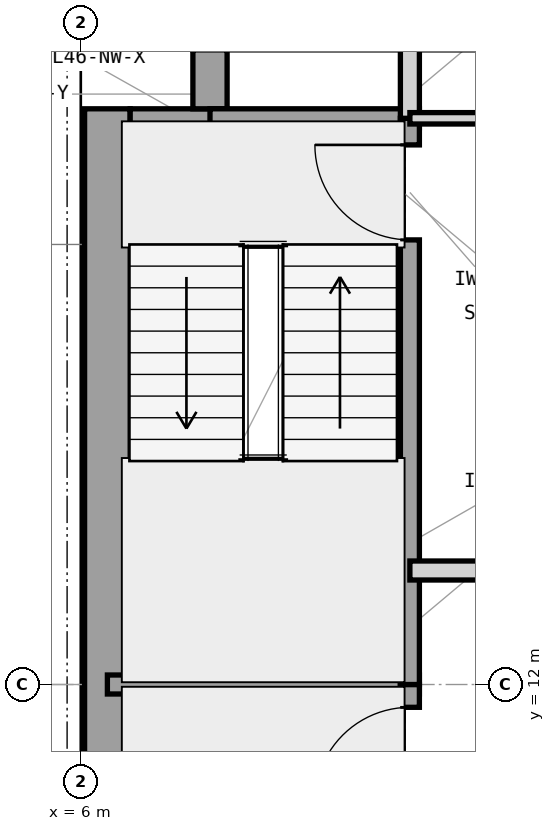
"""IFC4 building model, lengths in metres.
Left out: names, types, materials, properties, quantities, classifications, styles, units other than length and angle.
Written with IfcOpenShell. Run it as: python <this file> out.ifc"""

import sys

from ifc_helpers import new_model, si_unit, direction, frame, frame_2d, origin, place, context, subcontext, project, spatial, rectangle, extrude, element, fill, save


model = new_model("IFC4")
c1 = context("Model", 3, precision=1e-05, world=origin(), true_north=direction((0.0, 1.0)))
c2 = subcontext(c1, "Body", "Model", "MODEL_VIEW")
j1 = project(units=[si_unit("LENGTHUNIT", "METRE"), si_unit("PLANEANGLEUNIT", "RADIAN")], contexts=[c1])
p1 = place(None, origin())
s1 = spatial("IfcSite", under=j1, at=p1, CompositionType="ELEMENT")
p2 = place(p1, origin())
s2 = spatial("IfcBuilding", under=s1, at=p2, CompositionType="ELEMENT")
p3 = place(p2, frame((0.0, 0.0, 191.7)))
s3 = spatial("IfcBuildingStorey", under=s2, at=p3, CompositionType="ELEMENT", Elevation=191.7)
p4 = place(p3, frame((6.35, 4.425, 0.0), z_axis=(0.0, 0.0, 1.0), x_axis=(0.0, 1.0, 0.0)))
e1 = element("IfcWall", 1, at=p4, inside=s3, PredefinedType="SHEAR", context=c2, shape_type="SweptSolid", body=[
    extrude(rectangle(XDim=15.15, YDim=0.6, at=frame_2d((7.575, 0.0))), origin(), (0.0, 0.0, 1.0), 3.9),
])
p5 = place(p3, frame((6.65, 19.35, 0.0), z_axis=(0.0, 0.0, 1.0), x_axis=(1.0, 0.0, 0.0)))
e2 = element("IfcWall", 2, at=p5, inside=s3, PredefinedType="SHEAR", context=c2, shape_type="SweptSolid", body=[
    extrude(rectangle(XDim=1.275, YDim=0.45, at=frame_2d((0.638, 0.0))), origin(), (0.0, 0.0, 1.0), 3.9),
])
p6 = place(p3, frame((7.7, 19.575, 0.0), z_axis=(0.0, 0.0, 1.0), x_axis=(0.0, 1.0, 0.0)))
e3 = element("IfcWall", 3, at=p6, inside=s3, PredefinedType="SHEAR", context=c2, shape_type="SweptSolid", body=[
    extrude(rectangle(XDim=0.775, YDim=0.45, at=frame_2d((0.388, 0.0))), origin(), (0.0, 0.0, 1.0), 3.9),
])
p7 = place(p3, frame((6.35, 12.0, 0.0), z_axis=(0.0, 0.0, 1.0), x_axis=(1.0, 0.0, 0.0)))
e4 = element("IfcWall", 4, at=p7, inside=s3, PredefinedType="SHEAR", context=c2, shape_type="SweptSolid", body=[
    extrude(rectangle(XDim=4.105, YDim=0.25, at=frame_2d((2.052, 0.0))), origin(), (0.0, 0.0, 1.0), 3.9),
])
p8 = place(p3, frame((7.7, 19.45, 0.0), z_axis=(0.0, 0.0, 1.0), x_axis=(1.0, 0.0, 0.0)))
e5 = element("IfcWall", 5, at=p8, inside=s3, PredefinedType="SHEAR", context=c2, shape_type="SweptSolid", body=[
    extrude(rectangle(XDim=2.755, YDim=0.25, at=frame_2d((1.377, 0.0))), origin(), (0.0, 0.0, 1.0), 3.9),
])
p9 = place(p3, frame((10.33, 4.55, 0.0), z_axis=(0.0, 0.0, 1.0), x_axis=(0.0, 1.0, 0.0)))
e6 = element("IfcWall", 6, at=p9, inside=s3, PredefinedType="SHEAR", context=c2, shape_type="SweptSolid", body=[
    extrude(rectangle(XDim=7.45, YDim=0.25, at=frame_2d((3.725, 0.0))), origin(), (0.0, 0.0, 1.0), 3.9),
])
p10 = place(p9, frame((5.9, 0.0, 0.0)))
e7 = element("IfcOpeningElement", 7, at=p10, cuts=e6, PredefinedType="OPENING", context=c2, shape_type="SweptSolid", body=[
    extrude(rectangle(XDim=1.25, YDim=2.2, at=frame_2d((0.625, 1.1))), frame((0.0, 0.135, 0.0), z_axis=(0.0, -1.0, 0.0), x_axis=(1.0, 0.0, 0.0)), (0.0, 0.0, 1.0), 0.27),
])
p11 = place(p3, frame((10.33, 12.0, 0.0), z_axis=(0.0, 0.0, 1.0), x_axis=(0.0, 1.0, 0.0)))
e8 = element("IfcWall", 8, at=p11, inside=s3, PredefinedType="SHEAR", context=c2, shape_type="SweptSolid", body=[
    extrude(rectangle(XDim=7.45, YDim=0.25, at=frame_2d((3.725, 0.0))), origin(), (0.0, 0.0, 1.0), 3.9),
])
p12 = place(p11, frame((5.85, 0.0, 0.0)))
e9 = element("IfcOpeningElement", 9, at=p12, cuts=e8, PredefinedType="OPENING", context=c2, shape_type="SweptSolid", body=[
    extrude(rectangle(XDim=1.25, YDim=2.2, at=frame_2d((0.625, 1.1))), frame((0.0, 0.135, 0.0), z_axis=(0.0, -1.0, 0.0), x_axis=(1.0, 0.0, 0.0)), (0.0, 0.0, 1.0), 0.27),
])
p13 = place(p3, frame((10.33, 19.45, 0.0), z_axis=(0.0, 0.0, 1.0), x_axis=(0.0, 1.0, 0.0)))
e10 = element("IfcWall", 10, at=p13, inside=s3, PredefinedType="PARTITIONING", context=c2, shape_type="SweptSolid", body=[
    extrude(rectangle(XDim=1.2, YDim=0.25, at=frame_2d((0.6, 0.0))), origin(), (0.0, 0.0, 1.0), 3.073),
])
p14 = place(p3, frame((10.33, 13.5, 0.0), z_axis=(0.0, 0.0, 1.0), x_axis=(1.0, 0.0, 0.0)))
e11 = element("IfcWall", 11, at=p14, inside=s3, PredefinedType="PARTITIONING", context=c2, shape_type="SweptSolid", body=[
    extrude(rectangle(XDim=1.62, YDim=0.25, at=frame_2d((0.81, 0.0))), origin(), (0.0, 0.0, 1.0), 3.283),
])
p15 = place(p3, frame((10.33, 19.45, 0.0), z_axis=(0.0, 0.0, 1.0), x_axis=(1.0, 0.0, 0.0)))
e12 = element("IfcWall", 12, at=p15, inside=s3, PredefinedType="PARTITIONING", context=c2, shape_type="SweptSolid", body=[
    extrude(rectangle(XDim=3.82, YDim=0.15, at=frame_2d((1.91, 0.0))), origin(), (0.0, 0.0, 1.0), 3.69),
])
p16 = place(p15, frame((1.25, 0.0, 0.0)))
e13 = element("IfcOpeningElement", 13, at=p16, cuts=e12, PredefinedType="OPENING", context=c2, shape_type="SweptSolid", body=[
    extrude(rectangle(XDim=0.95, YDim=2.1, at=frame_2d((0.475, 1.05))), frame((0.0, 0.085, 0.0), z_axis=(0.0, -1.0, 0.0), x_axis=(1.0, 0.0, 0.0)), (0.0, 0.0, 1.0), 0.17),
])
p17 = place(p10, origin())
e14 = element("IfcDoor", 14, at=p17, inside=s3, OperationType="SINGLE_SWING_LEFT", PredefinedType="DOOR", context=c2, shape_type="SweptSolid", body=[
    extrude(rectangle(XDim=1.25, YDim=2.2, at=frame_2d((0.625, 1.1))), frame((0.0, 0.025, 0.0), z_axis=(0.0, -1.0, 0.0), x_axis=(1.0, 0.0, 0.0)), (0.0, 0.0, 1.0), 0.05),
])
fill(e7, e14)
p18 = place(p12, origin())
e15 = element("IfcDoor", 15, at=p18, inside=s3, OperationType="SINGLE_SWING_RIGHT", PredefinedType="DOOR", context=c2, shape_type="SweptSolid", body=[
    extrude(rectangle(XDim=1.25, YDim=2.2, at=frame_2d((0.625, 1.1))), frame((0.0, 0.025, 0.0), z_axis=(0.0, -1.0, 0.0), x_axis=(1.0, 0.0, 0.0)), (0.0, 0.0, 1.0), 0.05),
])
fill(e9, e15)
save(model, sys.argv[1])
